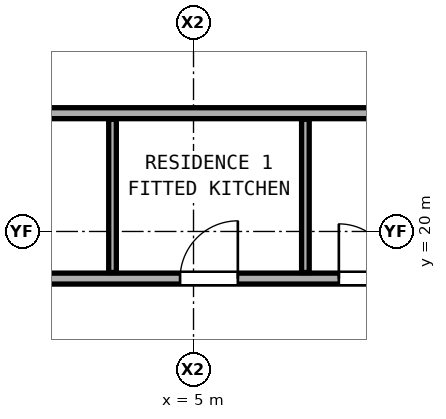
"""IFC4 building model, lengths in metres.
Left out: names, types, materials, properties, quantities, classifications, styles, units other than length and angle.
Written with IfcOpenShell. Run it as: python <this file> out.ifc"""

import sys

from ifc_helpers import new_model, si_unit, direction, frame, frame_2d, origin, place, context, subcontext, project, spatial, rectangle, extrude, element, fill, save


model = new_model("IFC4")
c1 = context("Model", 3, precision=1e-05, world=origin(), true_north=direction((0.0, 1.0)))
c2 = subcontext(c1, "Body", "Model", "MODEL_VIEW")
j1 = project(units=[si_unit("LENGTHUNIT", "METRE"), si_unit("PLANEANGLEUNIT", "RADIAN")], contexts=[c1])
p1 = place(None, origin())
s1 = spatial("IfcSite", under=j1, at=p1, CompositionType="ELEMENT")
p2 = place(p1, origin())
s2 = spatial("IfcBuilding", under=s1, at=p2, CompositionType="ELEMENT")
p3 = place(p2, frame((0.0, 0.0, 177.15)))
s3 = spatial("IfcBuildingStorey", under=s2, at=p3, CompositionType="ELEMENT", Elevation=177.15)
p4 = place(p3, frame((-1.09, 19.225, 0.0), z_axis=(0.0, 0.0, 1.0), x_axis=(1.0, 0.0, 0.0)))
e1 = element("IfcWall", 1, at=p4, inside=s3, PredefinedType="PARTITIONING", context=c2, shape_type="SweptSolid", body=[
    extrude(rectangle(XDim=9.97, YDim=0.18, at=frame_2d((4.985, 0.0))), origin(), (0.0, 0.0, 1.0), 2.269),
])
p5 = place(p4, frame((1.624, 0.0, 0.0)))
e2 = element("IfcOpeningElement", 2, at=p5, cuts=e1, PredefinedType="OPENING", context=c2, shape_type="SweptSolid", body=[
    extrude(rectangle(XDim=0.95, YDim=2.15, at=frame_2d((0.475, 1.075))), frame((0.0, 0.1, 0.0), z_axis=(0.0, -1.0, 0.0), x_axis=(1.0, 0.0, 0.0)), (0.0, 0.0, 1.0), 0.2),
])
p6 = place(p4, frame((5.869, 0.0, 0.0)))
e3 = element("IfcOpeningElement", 3, at=p6, cuts=e1, PredefinedType="OPENING", context=c2, shape_type="SweptSolid", body=[
    extrude(rectangle(XDim=0.95, YDim=2.15, at=frame_2d((0.475, 1.075))), frame((0.0, 0.1, 0.0), z_axis=(0.0, -1.0, 0.0), x_axis=(1.0, 0.0, 0.0)), (0.0, 0.0, 1.0), 0.2),
])
p7 = place(p4, frame((8.48, 0.0, 0.0)))
e4 = element("IfcOpeningElement", 4, at=p7, cuts=e1, PredefinedType="OPENING", context=c2, shape_type="SweptSolid", body=[
    extrude(rectangle(XDim=0.9, YDim=2.1, at=frame_2d((0.45, 1.05))), frame((0.0, 0.1, 0.0), z_axis=(0.0, -1.0, 0.0), x_axis=(1.0, 0.0, 0.0)), (0.0, 0.0, 1.0), 0.2),
])
p8 = place(p3, frame((-1.09, 21.945, 0.0), z_axis=(0.0, 0.0, 1.0), x_axis=(1.0, 0.0, 0.0)))
e5 = element("IfcWall", 5, at=p8, inside=s3, PredefinedType="PARTITIONING", context=c2, shape_type="SweptSolid", body=[
    extrude(rectangle(XDim=9.97, YDim=0.18, at=frame_2d((4.985, 0.0))), origin(), (0.0, 0.0, 1.0), 2.269),
])
for number, where, z_axis, x_axis in (
    (6, (3.668, 19.325, 0.0), (0.0, 0.0, 1.0), (0.0, 1.0, 0.0)),
    (7, (6.84, 19.325, 0.0), (0.0, 0.0, 1.0), (0.0, 1.0, 0.0)),
):
    element("IfcWall", number, at=place(p3, frame(where, z_axis=z_axis, x_axis=x_axis)), inside=s3, PredefinedType="PARTITIONING", context=c2, shape_type="SweptSolid", body=[
        extrude(rectangle(XDim=2.52, YDim=0.125, at=frame_2d((1.26, 0.0))), origin(), (0.0, 0.0, 1.0), 3.05),
    ])
p9 = place(p6, origin())
e8 = element("IfcDoor", 8, at=p9, inside=s3, OperationType="SINGLE_SWING_RIGHT", PredefinedType="DOOR", context=c2, shape_type="SweptSolid", body=[
    extrude(rectangle(XDim=0.95, YDim=2.15, at=frame_2d((0.475, 1.075))), frame((0.0, 0.025, 0.0), z_axis=(0.0, -1.0, 0.0), x_axis=(1.0, 0.0, 0.0)), (0.0, 0.0, 1.0), 0.05),
])
fill(e3, e8)
p10 = place(p7, origin())
e9 = element("IfcDoor", 9, at=p10, inside=s3, OperationType="SINGLE_SWING_LEFT", PredefinedType="DOOR", context=c2, shape_type="SweptSolid", body=[
    extrude(rectangle(XDim=0.9, YDim=2.1, at=frame_2d((0.45, 1.05))), frame((0.0, 0.025, 0.0), z_axis=(0.0, -1.0, 0.0), x_axis=(1.0, 0.0, 0.0)), (0.0, 0.0, 1.0), 0.05),
])
fill(e4, e9)
save(model, sys.argv[1])
